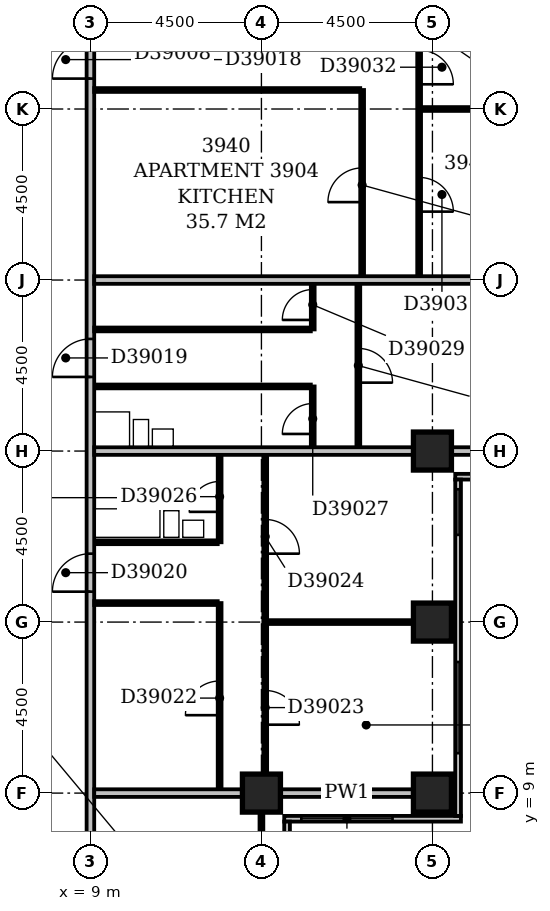
"""IFC4 building model, lengths in metres.
Left out: names, types, materials, properties, quantities, classifications, styles, units other than length and angle.
Written with IfcOpenShell. Run it as: python <this file> out.ifc"""

import sys

from ifc_helpers import new_model, si_unit, direction, frame, frame_2d, origin, origin_2d, place, context, subcontext, project, spatial, rectangle, extrude, element, fill, save


model = new_model("IFC4")
c1 = context("Model", 3, precision=1e-05, world=origin(), true_north=direction((0.0, 1.0)))
c2 = subcontext(c1, "Body", "Model", "MODEL_VIEW")
j1 = project(units=[si_unit("LENGTHUNIT", "METRE"), si_unit("PLANEANGLEUNIT", "RADIAN")], contexts=[c1])
p1 = place(None, origin())
s1 = spatial("IfcSite", under=j1, at=p1, CompositionType="ELEMENT")
p2 = place(p1, origin())
s2 = spatial("IfcBuilding", under=s1, at=p2, CompositionType="ELEMENT")
p3 = place(p2, frame((0.0, 0.0, 155.6)))
s3 = spatial("IfcBuildingStorey", under=s2, at=p3, CompositionType="ELEMENT", Elevation=155.6)
for number, where, z_axis, x_axis in (
    (1, (13.5, 9.0, -0.3), (0.0, 0.0, 1.0), (1.0, 0.0, 0.0)),
    (2, (18.0, 9.0, -0.3), (0.0, 0.0, 1.0), (1.0, 0.0, 0.0)),
    (3, (18.0, 13.5, -0.3), (0.0, 0.0, 1.0), (1.0, 0.0, 0.0)),
    (4, (18.0, 18.0, -0.3), (0.0, 0.0, 1.0), (1.0, 0.0, 0.0)),
):
    element("IfcColumn", number, at=place(p3, frame(where, z_axis=z_axis, x_axis=x_axis)), inside=s3, PredefinedType="COLUMN", context=c2, shape_type="SweptSolid", body=[
        extrude(rectangle(XDim=1.0, YDim=1.0, at=origin_2d()), origin(), (0.0, 0.0, 1.0), 3.6),
    ])
p4 = place(p3, frame((14.175, 3.9, 0.0), z_axis=(0.0, 0.0, 1.0), x_axis=(0.0, 1.0, 0.0)))
e5 = element("IfcWall", 5, at=p4, inside=s3, PredefinedType="STANDARD", context=c2, shape_type="SweptSolid", body=[
    extrude(rectangle(XDim=4.35, YDim=0.15, at=frame_2d((2.175, 0.0))), origin(), (0.0, 0.0, 1.0), 2.7),
])
p5 = place(p4, frame((1.65, 0.0, 0.6)))
e6 = element("IfcOpeningElement", 6, at=p5, cuts=e5, PredefinedType="OPENING", context=c2, shape_type="SweptSolid", body=[
    extrude(rectangle(XDim=2.4, YDim=1.8, at=frame_2d((1.2, 0.9))), frame((0.0, 0.087, 0.0), z_axis=(0.0, -1.0, 0.0), x_axis=(1.0, 0.0, 0.0)), (0.0, 0.0, 1.0), 0.174),
])
p6 = place(p3, frame((14.1, 8.325, 0.0), z_axis=(0.0, 0.0, 1.0), x_axis=(1.0, 0.0, 0.0)))
e7 = element("IfcWall", 7, at=p6, inside=s3, PredefinedType="STANDARD", context=c2, shape_type="SweptSolid", body=[
    extrude(rectangle(XDim=4.65, YDim=0.15, at=frame_2d((2.325, 0.0))), origin(), (0.0, 0.0, 1.0), 2.7),
])
p7 = place(p6, frame((0.45, 0.0, 0.6)))
e8 = element("IfcOpeningElement", 8, at=p7, cuts=e7, PredefinedType="OPENING", context=c2, shape_type="SweptSolid", body=[
    extrude(rectangle(XDim=2.4, YDim=1.8, at=frame_2d((1.2, 0.9))), frame((0.0, 0.087, 0.0), z_axis=(0.0, -1.0, 0.0), x_axis=(1.0, 0.0, 0.0)), (0.0, 0.0, 1.0), 0.174),
])
p8 = place(p3, frame((18.675, 8.4, 0.0), z_axis=(0.0, 0.0, 1.0), x_axis=(0.0, 1.0, 0.0)))
e9 = element("IfcWall", 9, at=p8, inside=s3, PredefinedType="STANDARD", context=c2, shape_type="SweptSolid", body=[
    extrude(rectangle(XDim=8.85, YDim=0.15, at=frame_2d((4.425, 0.0))), origin(), (0.0, 0.0, 1.0), 2.7),
])
p9 = place(p8, frame((1.65, 0.0, 0.6)))
e10 = element("IfcOpeningElement", 10, at=p9, cuts=e9, PredefinedType="OPENING", context=c2, shape_type="SweptSolid", body=[
    extrude(rectangle(XDim=2.4, YDim=1.8, at=frame_2d((1.2, 0.9))), frame((0.0, 0.087, 0.0), z_axis=(0.0, -1.0, 0.0), x_axis=(1.0, 0.0, 0.0)), (0.0, 0.0, 1.0), 0.174),
])
p10 = place(p8, frame((7.395, 0.0, 0.6)))
e11 = element("IfcOpeningElement", 11, at=p10, cuts=e9, PredefinedType="OPENING", context=c2, shape_type="SweptSolid", body=[
    extrude(rectangle(XDim=1.2, YDim=1.8, at=frame_2d((0.6, 0.9))), frame((0.0, 0.087, 0.0), z_axis=(0.0, -1.0, 0.0), x_axis=(1.0, 0.0, 0.0)), (0.0, 0.0, 1.0), 0.174),
])
p11 = place(p3, frame((18.6, 17.325, 0.0), z_axis=(0.0, 0.0, 1.0), x_axis=(1.0, 0.0, 0.0)))
e12 = element("IfcWall", 12, at=p11, inside=s3, PredefinedType="STANDARD", context=c2, shape_type="SweptSolid", body=[
    extrude(rectangle(XDim=4.65, YDim=0.15, at=frame_2d((2.325, 0.0))), origin(), (0.0, 0.0, 1.0), 2.7),
])
p12 = place(p11, frame((0.45, 0.0, 0.6)))
e13 = element("IfcOpeningElement", 13, at=p12, cuts=e12, PredefinedType="OPENING", context=c2, shape_type="SweptSolid", body=[
    extrude(rectangle(XDim=2.4, YDim=1.8, at=frame_2d((1.2, 0.9))), frame((0.0, 0.087, 0.0), z_axis=(0.0, -1.0, 0.0), x_axis=(1.0, 0.0, 0.0)), (0.0, 0.0, 1.0), 0.174),
])
p13 = place(p3, frame((9.0, 5.0, 0.0), z_axis=(0.0, 0.0, 1.0), x_axis=(0.0, 1.0, 0.0)))
e14 = element("IfcWall", 14, at=p13, inside=s3, PredefinedType="PARTITIONING", context=c2, shape_type="SweptSolid", body=[
    extrude(rectangle(XDim=27.75, YDim=0.2, at=frame_2d((13.875, 0.0))), origin(), (0.0, 0.0, 1.0), 3.3),
])
p14 = place(p13, frame((22.8, 0.0, 0.0)))
e15 = element("IfcOpeningElement", 15, at=p14, cuts=e14, PredefinedType="OPENING", context=c2, shape_type="SweptSolid", body=[
    extrude(rectangle(XDim=1.0, YDim=2.1, at=frame_2d((0.5, 1.05))), frame((0.0, 0.112, 0.0), z_axis=(0.0, -1.0, 0.0), x_axis=(1.0, 0.0, 0.0)), (0.0, 0.0, 1.0), 0.224),
])
p15 = place(p13, frame((14.95, 0.0, 0.0)))
e16 = element("IfcOpeningElement", 16, at=p15, cuts=e14, PredefinedType="OPENING", context=c2, shape_type="SweptSolid", body=[
    extrude(rectangle(XDim=1.0, YDim=2.1, at=frame_2d((0.5, 1.05))), frame((0.0, 0.112, 0.0), z_axis=(0.0, -1.0, 0.0), x_axis=(1.0, 0.0, 0.0)), (0.0, 0.0, 1.0), 0.224),
])
p16 = place(p13, frame((9.3, 0.0, 0.0)))
e17 = element("IfcOpeningElement", 17, at=p16, cuts=e14, PredefinedType="OPENING", context=c2, shape_type="SweptSolid", body=[
    extrude(rectangle(XDim=1.0, YDim=2.1, at=frame_2d((0.5, 1.05))), frame((0.0, 0.112, 0.0), z_axis=(0.0, -1.0, 0.0), x_axis=(1.0, 0.0, 0.0)), (0.0, 0.0, 1.0), 0.224),
])
p17 = place(p13, frame((1.5, 0.0, 0.0)))
e18 = element("IfcOpeningElement", 18, at=p17, cuts=e14, PredefinedType="OPENING", context=c2, shape_type="SweptSolid", body=[
    extrude(rectangle(XDim=0.9, YDim=2.1, at=frame_2d((0.45, 1.05))), frame((0.0, 0.112, 0.0), z_axis=(0.0, -1.0, 0.0), x_axis=(1.0, 0.0, 0.0)), (0.0, 0.0, 1.0), 0.224),
])
p18 = place(p3, frame((13.5, 5.0, 0.0), z_axis=(0.0, 0.0, 1.0), x_axis=(0.0, 1.0, 0.0)))
e19 = element("IfcWall", 19, at=p18, inside=s3, PredefinedType="PARTITIONING", context=c2, shape_type="SweptSolid", body=[
    extrude(rectangle(XDim=3.5, YDim=0.1, at=frame_2d((1.75, 0.0))), origin(), (0.0, 0.0, 1.0), 2.7),
])
p19 = place(p3, frame((9.1, 9.0, 0.0), z_axis=(0.0, 0.0, 1.0), x_axis=(1.0, 0.0, 0.0)))
e20 = element("IfcWall", 20, at=p19, inside=s3, PredefinedType="PARTITIONING", context=c2, shape_type="SweptSolid", body=[
    extrude(rectangle(XDim=3.9, YDim=0.2, at=frame_2d((1.95, 0.0))), origin(), (0.0, 0.0, 1.0), 3.3),
])
p20 = place(p3, frame((14.0, 9.0, 0.0), z_axis=(0.0, 0.0, 1.0), x_axis=(1.0, 0.0, 0.0)))
e21 = element("IfcWall", 21, at=p20, inside=s3, PredefinedType="PARTITIONING", context=c2, shape_type="SweptSolid", body=[
    extrude(rectangle(XDim=3.5, YDim=0.2, at=frame_2d((1.75, 0.0))), origin(), (0.0, 0.0, 1.0), 2.7),
])
p21 = place(p3, frame((12.4, 9.1, 0.0), z_axis=(0.0, 0.0, 1.0), x_axis=(0.0, 1.0, 0.0)))
e22 = element("IfcWall", 22, at=p21, inside=s3, PredefinedType="PARTITIONING", context=c2, shape_type="SweptSolid", body=[
    extrude(rectangle(XDim=4.9, YDim=0.1, at=frame_2d((2.45, 0.0))), origin(), (0.0, 0.0, 1.0), 3.3),
])
p22 = place(p21, frame((1.95, 0.0, 0.0)))
e23 = element("IfcOpeningElement", 23, at=p22, cuts=e22, PredefinedType="OPENING", context=c2, shape_type="SweptSolid", body=[
    extrude(rectangle(XDim=0.9, YDim=2.1, at=frame_2d((0.45, 1.05))), frame((0.0, 0.062, 0.0), z_axis=(0.0, -1.0, 0.0), x_axis=(1.0, 0.0, 0.0)), (0.0, 0.0, 1.0), 0.124),
])
p23 = place(p3, frame((13.6, 9.5, 0.0), z_axis=(0.0, 0.0, 1.0), x_axis=(0.0, 1.0, 0.0)))
e24 = element("IfcWall", 24, at=p23, inside=s3, PredefinedType="PARTITIONING", context=c2, shape_type="SweptSolid", body=[
    extrude(rectangle(XDim=8.4, YDim=0.1, at=frame_2d((4.2, 0.0))), origin(), (0.0, 0.0, 1.0), 3.3),
])
p24 = place(p23, frame((1.3, 0.0, 0.0)))
e25 = element("IfcOpeningElement", 25, at=p24, cuts=e24, PredefinedType="OPENING", context=c2, shape_type="SweptSolid", body=[
    extrude(rectangle(XDim=0.9, YDim=2.1, at=frame_2d((0.45, 1.05))), frame((0.0, 0.062, 0.0), z_axis=(0.0, -1.0, 0.0), x_axis=(1.0, 0.0, 0.0)), (0.0, 0.0, 1.0), 0.124),
])
p25 = place(p23, frame((5.8, 0.0, 0.0)))
e26 = element("IfcOpeningElement", 26, at=p25, cuts=e24, PredefinedType="OPENING", context=c2, shape_type="SweptSolid", body=[
    extrude(rectangle(XDim=0.9, YDim=2.1, at=frame_2d((0.45, 1.05))), frame((0.0, 0.062, 0.0), z_axis=(0.0, -1.0, 0.0), x_axis=(1.0, 0.0, 0.0)), (0.0, 0.0, 1.0), 0.124),
])
p26 = place(p3, frame((13.65, 13.5, 0.0), z_axis=(0.0, 0.0, 1.0), x_axis=(1.0, 0.0, 0.0)))
e27 = element("IfcWall", 27, at=p26, inside=s3, PredefinedType="PARTITIONING", context=c2, shape_type="SweptSolid", body=[
    extrude(rectangle(XDim=3.85, YDim=0.1, at=frame_2d((1.925, 0.0))), origin(), (0.0, 0.0, 1.0), 3.3),
])
p27 = place(p3, frame((9.1, 14.0, 0.0), z_axis=(0.0, 0.0, 1.0), x_axis=(1.0, 0.0, 0.0)))
e28 = element("IfcWall", 28, at=p27, inside=s3, PredefinedType="PARTITIONING", context=c2, shape_type="SweptSolid", body=[
    extrude(rectangle(XDim=3.25, YDim=0.1, at=frame_2d((1.625, 0.0))), origin(), (0.0, 0.0, 1.0), 3.3),
])
p28 = place(p3, frame((9.1, 15.6, 0.0), z_axis=(0.0, 0.0, 1.0), x_axis=(1.0, 0.0, 0.0)))
e29 = element("IfcWall", 29, at=p28, inside=s3, PredefinedType="PLUMBINGWALL", context=c2, shape_type="SweptSolid", body=[
    extrude(rectangle(XDim=3.25, YDim=0.1, at=frame_2d((1.625, 0.0))), origin(), (0.0, 0.0, 1.0), 3.3),
])
p29 = place(p3, frame((12.4, 15.6, 0.0), z_axis=(0.0, 0.0, 1.0), x_axis=(0.0, 1.0, 0.0)))
e30 = element("IfcWall", 30, at=p29, inside=s3, PredefinedType="PARTITIONING", context=c2, shape_type="SweptSolid", body=[
    extrude(rectangle(XDim=2.3, YDim=0.1, at=frame_2d((1.15, 0.0))), origin(), (0.0, 0.0, 1.0), 3.3),
])
p30 = place(p29, frame((0.8, 0.0, 0.0)))
e31 = element("IfcOpeningElement", 31, at=p30, cuts=e30, PredefinedType="OPENING", context=c2, shape_type="SweptSolid", body=[
    extrude(rectangle(XDim=0.8, YDim=2.1, at=frame_2d((0.4, 1.05))), frame((0.0, 0.062, 0.0), z_axis=(0.0, -1.0, 0.0), x_axis=(1.0, 0.0, 0.0)), (0.0, 0.0, 1.0), 0.124),
])
p31 = place(p3, frame((9.1, 18.0, 0.0), z_axis=(0.0, 0.0, 1.0), x_axis=(1.0, 0.0, 0.0)))
e32 = element("IfcWall", 32, at=p31, inside=s3, PredefinedType="PARTITIONING", context=c2, shape_type="SweptSolid", body=[
    extrude(rectangle(XDim=8.4, YDim=0.2, at=frame_2d((4.2, 0.0))), origin(), (0.0, 0.0, 1.0), 2.6),
])
p32 = place(p3, frame((18.5, 18.0, 0.0), z_axis=(0.0, 0.0, 1.0), x_axis=(1.0, 0.0, 0.0)))
e33 = element("IfcWall", 33, at=p32, inside=s3, PredefinedType="PARTITIONING", context=c2, shape_type="SweptSolid", body=[
    extrude(rectangle(XDim=3.5, YDim=0.2, at=frame_2d((1.75, 0.0))), origin(), (0.0, 0.0, 1.0), 2.7),
])
p33 = place(p3, frame((14.85, 18.1, 0.0), z_axis=(0.0, 0.0, 1.0), x_axis=(0.0, 1.0, 0.0)))
e34 = element("IfcWall", 34, at=p33, inside=s3, PredefinedType="PARTITIONING", context=c2, shape_type="SweptSolid", body=[
    extrude(rectangle(XDim=1.6, YDim=0.1, at=frame_2d((0.8, 0.0))), origin(), (0.0, 0.0, 1.0), 3.3),
])
p34 = place(p33, frame((0.35, 0.0, 0.0)))
e35 = element("IfcOpeningElement", 35, at=p34, cuts=e34, PredefinedType="OPENING", context=c2, shape_type="SweptSolid", body=[
    extrude(rectangle(XDim=0.8, YDim=2.1, at=frame_2d((0.4, 1.05))), frame((0.0, 0.062, 0.0), z_axis=(0.0, -1.0, 0.0), x_axis=(1.0, 0.0, 0.0)), (0.0, 0.0, 1.0), 0.124),
])
p35 = place(p3, frame((16.05, 18.1, 0.0), z_axis=(0.0, 0.0, 1.0), x_axis=(0.0, 1.0, 0.0)))
e36 = element("IfcWall", 36, at=p35, inside=s3, PredefinedType="PARTITIONING", context=c2, shape_type="SweptSolid", body=[
    extrude(rectangle(XDim=4.3, YDim=0.1, at=frame_2d((2.15, 0.0))), origin(), (0.0, 0.0, 1.0), 3.3),
])
p36 = place(p35, frame((1.7, 0.0, 0.0)))
e37 = element("IfcOpeningElement", 37, at=p36, cuts=e36, PredefinedType="OPENING", context=c2, shape_type="SweptSolid", body=[
    extrude(rectangle(XDim=0.9, YDim=2.1, at=frame_2d((0.45, 1.05))), frame((0.0, 0.062, 0.0), z_axis=(0.0, -1.0, 0.0), x_axis=(1.0, 0.0, 0.0)), (0.0, 0.0, 1.0), 0.124),
])
p37 = place(p3, frame((9.1, 19.7, 0.0), z_axis=(0.0, 0.0, 1.0), x_axis=(1.0, 0.0, 0.0)))
e38 = element("IfcWall", 38, at=p37, inside=s3, PredefinedType="PLUMBINGWALL", context=c2, shape_type="SweptSolid", body=[
    extrude(rectangle(XDim=5.7, YDim=0.1, at=frame_2d((2.85, 0.0))), origin(), (0.0, 0.0, 1.0), 3.3),
])
p38 = place(p3, frame((9.1, 21.2, 0.0), z_axis=(0.0, 0.0, 1.0), x_axis=(1.0, 0.0, 0.0)))
e39 = element("IfcWall", 39, at=p38, inside=s3, PredefinedType="PARTITIONING", context=c2, shape_type="SweptSolid", body=[
    extrude(rectangle(XDim=5.7, YDim=0.1, at=frame_2d((2.85, 0.0))), origin(), (0.0, 0.0, 1.0), 3.3),
])
p39 = place(p3, frame((14.85, 21.2, 0.0), z_axis=(0.0, 0.0, 1.0), x_axis=(0.0, 1.0, 0.0)))
e40 = element("IfcWall", 40, at=p39, inside=s3, PredefinedType="PARTITIONING", context=c2, shape_type="SweptSolid", body=[
    extrude(rectangle(XDim=1.2, YDim=0.1, at=frame_2d((0.6, 0.0))), origin(), (0.0, 0.0, 1.0), 3.3),
])
p40 = place(p39, frame((0.25, 0.0, 0.0)))
e41 = element("IfcOpeningElement", 41, at=p40, cuts=e40, PredefinedType="OPENING", context=c2, shape_type="SweptSolid", body=[
    extrude(rectangle(XDim=0.8, YDim=2.1, at=frame_2d((0.4, 1.05))), frame((0.0, 0.062, 0.0), z_axis=(0.0, -1.0, 0.0), x_axis=(1.0, 0.0, 0.0)), (0.0, 0.0, 1.0), 0.124),
])
p41 = place(p3, frame((9.1, 22.5, 0.0), z_axis=(0.0, 0.0, 1.0), x_axis=(1.0, 0.0, 0.0)))
e42 = element("IfcWall", 42, at=p41, inside=s3, PredefinedType="PARTITIONING", context=c2, shape_type="SweptSolid", body=[
    extrude(rectangle(XDim=12.9, YDim=0.2, at=frame_2d((6.45, 0.0))), origin(), (0.0, 0.0, 1.0), 3.3),
])
p42 = place(p3, frame((16.15, 22.6, 0.0), z_axis=(0.0, 0.0, 1.0), x_axis=(0.0, 1.0, 0.0)))
e43 = element("IfcWall", 43, at=p42, inside=s3, PredefinedType="PARTITIONING", context=c2, shape_type="SweptSolid", body=[
    extrude(rectangle(XDim=4.9, YDim=0.1, at=frame_2d((2.45, 0.0))), origin(), (0.0, 0.0, 1.0), 3.3),
])
p43 = place(p42, frame((1.95, 0.0, 0.0)))
e44 = element("IfcOpeningElement", 44, at=p43, cuts=e43, PredefinedType="OPENING", context=c2, shape_type="SweptSolid", body=[
    extrude(rectangle(XDim=0.9, YDim=2.1, at=frame_2d((0.45, 1.05))), frame((0.0, 0.062, 0.0), z_axis=(0.0, -1.0, 0.0), x_axis=(1.0, 0.0, 0.0)), (0.0, 0.0, 1.0), 0.124),
])
p44 = place(p3, frame((17.65, 22.6, 0.0), z_axis=(0.0, 0.0, 1.0), x_axis=(0.0, 1.0, 0.0)))
e45 = element("IfcWall", 45, at=p44, inside=s3, PredefinedType="PARTITIONING", context=c2, shape_type="SweptSolid", body=[
    extrude(rectangle(XDim=8.8, YDim=0.1, at=frame_2d((4.4, 0.0))), origin(), (0.0, 0.0, 1.0), 3.3),
])
p45 = place(p44, frame((1.7, 0.0, 0.0)))
e46 = element("IfcOpeningElement", 46, at=p45, cuts=e45, PredefinedType="OPENING", context=c2, shape_type="SweptSolid", body=[
    extrude(rectangle(XDim=0.9, YDim=2.1, at=frame_2d((0.45, 1.05))), frame((0.0, 0.062, 0.0), z_axis=(0.0, -1.0, 0.0), x_axis=(1.0, 0.0, 0.0)), (0.0, 0.0, 1.0), 0.124),
])
p46 = place(p44, frame((5.05, 0.0, 0.0)))
e47 = element("IfcOpeningElement", 47, at=p46, cuts=e45, PredefinedType="OPENING", context=c2, shape_type="SweptSolid", body=[
    extrude(rectangle(XDim=0.9, YDim=2.1, at=frame_2d((0.45, 1.05))), frame((0.0, 0.062, 0.0), z_axis=(0.0, -1.0, 0.0), x_axis=(1.0, 0.0, 0.0)), (0.0, 0.0, 1.0), 0.124),
])
p47 = place(p3, frame((17.7, 27.0, 0.0), z_axis=(0.0, 0.0, 1.0), x_axis=(1.0, 0.0, 0.0)))
e48 = element("IfcWall", 48, at=p47, inside=s3, PredefinedType="PARTITIONING", context=c2, shape_type="SweptSolid", body=[
    extrude(rectangle(XDim=4.3, YDim=0.1, at=frame_2d((2.15, 0.0))), origin(), (0.0, 0.0, 1.0), 2.7),
])
p48 = place(p3, frame((9.1, 27.5, 0.0), z_axis=(0.0, 0.0, 1.0), x_axis=(1.0, 0.0, 0.0)))
e49 = element("IfcWall", 49, at=p48, inside=s3, PredefinedType="PARTITIONING", context=c2, shape_type="SweptSolid", body=[
    extrude(rectangle(XDim=7.0, YDim=0.1, at=frame_2d((3.5, 0.0))), origin(), (0.0, 0.0, 1.0), 2.7),
])
p49 = place(p7, origin())
e50 = element("IfcWindow", 50, at=p49, inside=s3, PartitioningType="SINGLE_PANEL", PredefinedType="WINDOW", context=c2, shape_type="SweptSolid", body=[
    extrude(rectangle(XDim=2.4, YDim=1.8, at=frame_2d((1.2, 0.9))), frame((0.0, 0.03, 0.0), z_axis=(0.0, -1.0, 0.0), x_axis=(1.0, 0.0, 0.0)), (0.0, 0.0, 1.0), 0.06),
])
fill(e8, e50)
p50 = place(p9, origin())
e51 = element("IfcWindow", 51, at=p50, inside=s3, PartitioningType="SINGLE_PANEL", PredefinedType="WINDOW", context=c2, shape_type="SweptSolid", body=[
    extrude(rectangle(XDim=2.4, YDim=1.8, at=frame_2d((1.2, 0.9))), frame((0.0, 0.03, 0.0), z_axis=(0.0, -1.0, 0.0), x_axis=(1.0, 0.0, 0.0)), (0.0, 0.0, 1.0), 0.06),
])
fill(e10, e51)
p51 = place(p10, origin())
e52 = element("IfcWindow", 52, at=p51, inside=s3, PartitioningType="SINGLE_PANEL", PredefinedType="WINDOW", context=c2, shape_type="SweptSolid", body=[
    extrude(rectangle(XDim=1.2, YDim=1.8, at=frame_2d((0.6, 0.9))), frame((0.0, 0.03, 0.0), z_axis=(0.0, -1.0, 0.0), x_axis=(1.0, 0.0, 0.0)), (0.0, 0.0, 1.0), 0.06),
])
fill(e11, e52)
p52 = place(p14, origin())
e53 = element("IfcDoor", 53, at=p52, inside=s3, OperationType="SINGLE_SWING_LEFT", PredefinedType="DOOR", context=c2, shape_type="SweptSolid", body=[
    extrude(rectangle(XDim=1.0, YDim=2.1, at=frame_2d((0.5, 1.05))), frame((0.0, 0.025, 0.0), z_axis=(0.0, -1.0, 0.0), x_axis=(1.0, 0.0, 0.0)), (0.0, 0.0, 1.0), 0.05),
])
fill(e15, e53)
p53 = place(p15, origin())
e54 = element("IfcDoor", 54, at=p53, inside=s3, OperationType="SINGLE_SWING_LEFT", PredefinedType="DOOR", context=c2, shape_type="SweptSolid", body=[
    extrude(rectangle(XDim=1.0, YDim=2.1, at=frame_2d((0.5, 1.05))), frame((0.0, 0.025, 0.0), z_axis=(0.0, -1.0, 0.0), x_axis=(1.0, 0.0, 0.0)), (0.0, 0.0, 1.0), 0.05),
])
fill(e16, e54)
p54 = place(p16, origin())
e55 = element("IfcDoor", 55, at=p54, inside=s3, OperationType="SINGLE_SWING_LEFT", PredefinedType="DOOR", context=c2, shape_type="SweptSolid", body=[
    extrude(rectangle(XDim=1.0, YDim=2.1, at=frame_2d((0.5, 1.05))), frame((0.0, 0.025, 0.0), z_axis=(0.0, -1.0, 0.0), x_axis=(1.0, 0.0, 0.0)), (0.0, 0.0, 1.0), 0.05),
])
fill(e17, e55)
p55 = place(p22, origin())
e56 = element("IfcDoor", 56, at=p55, inside=s3, OperationType="SINGLE_SWING_LEFT", PredefinedType="DOOR", context=c2, shape_type="SweptSolid", body=[
    extrude(rectangle(XDim=0.9, YDim=2.1, at=frame_2d((0.45, 1.05))), frame((0.0, 0.025, 0.0), z_axis=(0.0, -1.0, 0.0), x_axis=(1.0, 0.0, 0.0)), (0.0, 0.0, 1.0), 0.05),
])
fill(e23, e56)
p56 = place(p24, frame((0.9, 0.0, 0.0), z_axis=(0.0, 0.0, 1.0), x_axis=(-1.0, 0.0, 0.0)))
e57 = element("IfcDoor", 57, at=p56, inside=s3, OperationType="SINGLE_SWING_RIGHT", PredefinedType="DOOR", context=c2, shape_type="SweptSolid", body=[
    extrude(rectangle(XDim=0.9, YDim=2.1, at=frame_2d((0.45, 1.05))), frame((0.0, 0.025, 0.0), z_axis=(0.0, -1.0, 0.0), x_axis=(1.0, 0.0, 0.0)), (0.0, 0.0, 1.0), 0.05),
])
fill(e25, e57)
p57 = place(p25, frame((0.9, 0.0, 0.0), z_axis=(0.0, 0.0, 1.0), x_axis=(-1.0, 0.0, 0.0)))
e58 = element("IfcDoor", 58, at=p57, inside=s3, OperationType="SINGLE_SWING_RIGHT", PredefinedType="DOOR", context=c2, shape_type="SweptSolid", body=[
    extrude(rectangle(XDim=0.9, YDim=2.1, at=frame_2d((0.45, 1.05))), frame((0.0, 0.025, 0.0), z_axis=(0.0, -1.0, 0.0), x_axis=(1.0, 0.0, 0.0)), (0.0, 0.0, 1.0), 0.05),
])
fill(e26, e58)
p58 = place(p30, origin())
e59 = element("IfcDoor", 59, at=p58, inside=s3, OperationType="SINGLE_SWING_LEFT", PredefinedType="DOOR", context=c2, shape_type="SweptSolid", body=[
    extrude(rectangle(XDim=0.8, YDim=2.1, at=frame_2d((0.4, 1.05))), frame((0.0, 0.025, 0.0), z_axis=(0.0, -1.0, 0.0), x_axis=(1.0, 0.0, 0.0)), (0.0, 0.0, 1.0), 0.05),
])
fill(e31, e59)
p59 = place(p34, origin())
e60 = element("IfcDoor", 60, at=p59, inside=s3, OperationType="SINGLE_SWING_LEFT", PredefinedType="DOOR", context=c2, shape_type="SweptSolid", body=[
    extrude(rectangle(XDim=0.8, YDim=2.1, at=frame_2d((0.4, 1.05))), frame((0.0, 0.025, 0.0), z_axis=(0.0, -1.0, 0.0), x_axis=(1.0, 0.0, 0.0)), (0.0, 0.0, 1.0), 0.05),
])
fill(e35, e60)
p60 = place(p36, frame((0.9, 0.0, 0.0), z_axis=(0.0, 0.0, 1.0), x_axis=(-1.0, 0.0, 0.0)))
e61 = element("IfcDoor", 61, at=p60, inside=s3, OperationType="SINGLE_SWING_RIGHT", PredefinedType="DOOR", context=c2, shape_type="SweptSolid", body=[
    extrude(rectangle(XDim=0.9, YDim=2.1, at=frame_2d((0.45, 1.05))), frame((0.0, 0.025, 0.0), z_axis=(0.0, -1.0, 0.0), x_axis=(1.0, 0.0, 0.0)), (0.0, 0.0, 1.0), 0.05),
])
fill(e37, e61)
p61 = place(p40, origin())
e62 = element("IfcDoor", 62, at=p61, inside=s3, OperationType="SINGLE_SWING_LEFT", PredefinedType="DOOR", context=c2, shape_type="SweptSolid", body=[
    extrude(rectangle(XDim=0.8, YDim=2.1, at=frame_2d((0.4, 1.05))), frame((0.0, 0.025, 0.0), z_axis=(0.0, -1.0, 0.0), x_axis=(1.0, 0.0, 0.0)), (0.0, 0.0, 1.0), 0.05),
])
fill(e41, e62)
p62 = place(p43, origin())
e63 = element("IfcDoor", 63, at=p62, inside=s3, OperationType="SINGLE_SWING_LEFT", PredefinedType="DOOR", context=c2, shape_type="SweptSolid", body=[
    extrude(rectangle(XDim=0.9, YDim=2.1, at=frame_2d((0.45, 1.05))), frame((0.0, 0.025, 0.0), z_axis=(0.0, -1.0, 0.0), x_axis=(1.0, 0.0, 0.0)), (0.0, 0.0, 1.0), 0.05),
])
fill(e44, e63)
p63 = place(p45, frame((0.9, 0.0, 0.0), z_axis=(0.0, 0.0, 1.0), x_axis=(-1.0, 0.0, 0.0)))
e64 = element("IfcDoor", 64, at=p63, inside=s3, OperationType="SINGLE_SWING_RIGHT", PredefinedType="DOOR", context=c2, shape_type="SweptSolid", body=[
    extrude(rectangle(XDim=0.9, YDim=2.1, at=frame_2d((0.45, 1.05))), frame((0.0, 0.025, 0.0), z_axis=(0.0, -1.0, 0.0), x_axis=(1.0, 0.0, 0.0)), (0.0, 0.0, 1.0), 0.05),
])
fill(e46, e64)
p64 = place(p46, frame((0.9, 0.0, 0.0), z_axis=(0.0, 0.0, 1.0), x_axis=(-1.0, 0.0, 0.0)))
e65 = element("IfcDoor", 65, at=p64, inside=s3, OperationType="SINGLE_SWING_RIGHT", PredefinedType="DOOR", context=c2, shape_type="SweptSolid", body=[
    extrude(rectangle(XDim=0.9, YDim=2.1, at=frame_2d((0.45, 1.05))), frame((0.0, 0.025, 0.0), z_axis=(0.0, -1.0, 0.0), x_axis=(1.0, 0.0, 0.0)), (0.0, 0.0, 1.0), 0.05),
])
fill(e47, e65)
save(model, sys.argv[1])
